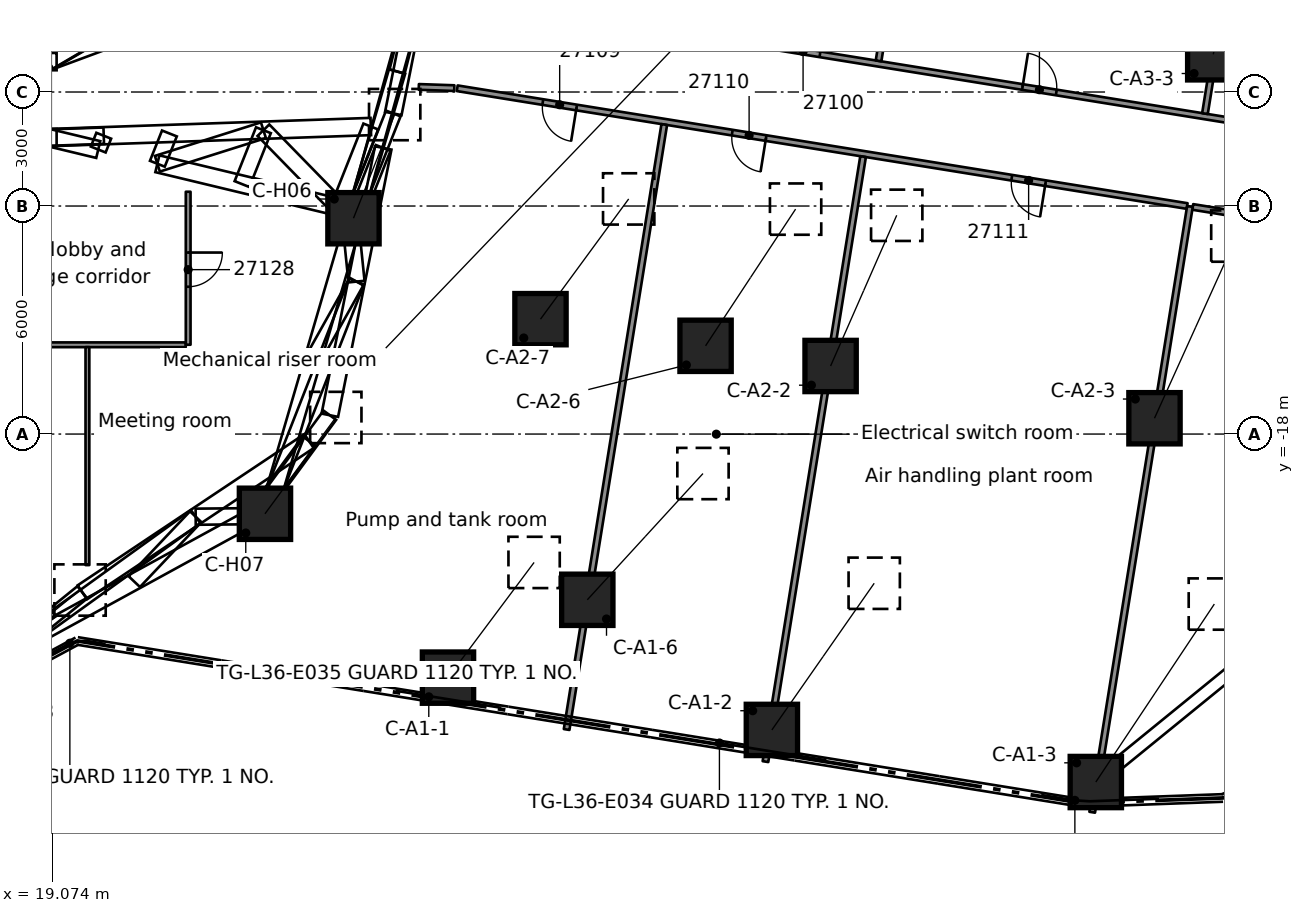
"""IFC4 building model, lengths in metres.
Left out: names, types, materials, properties, quantities, classifications, styles, units other than length and angle.
Written with IfcOpenShell. Run it as: python <this file> out.ifc"""

import sys

from ifc_helpers import new_model, si_unit, direction, frame, frame_2d, origin, origin_2d, place, context, subcontext, project, spatial, rectangle, extrude, element, fill, save


model = new_model("IFC4")
c1 = context("Model", 3, precision=1e-05, world=origin(), true_north=direction((0.0, 1.0)))
c2 = subcontext(c1, "Body", "Model", "MODEL_VIEW")
j1 = project(units=[si_unit("LENGTHUNIT", "METRE"), si_unit("PLANEANGLEUNIT", "RADIAN")], contexts=[c1])
p1 = place(None, origin())
s1 = spatial("IfcSite", under=j1, at=p1, CompositionType="ELEMENT")
p2 = place(p1, origin())
s2 = spatial("IfcBuilding", under=s1, at=p2, CompositionType="ELEMENT")
p3 = place(p2, frame((0.0, 0.0, 141.2)))
s3 = spatial("IfcBuildingStorey", under=s2, at=p3, CompositionType="ELEMENT", Elevation=141.2)
p4 = place(p3, frame((29.488, -24.409, 0.502), z_axis=(0.445669755375, 0.596163130372, 0.667808349101), x_axis=(-0.800935761817, 0.598750286382, 0.0)))
e1 = element("IfcColumn", 1, at=p4, inside=s3, PredefinedType="COLUMN", context=c2, shape_type="SweptSolid", body=[
    extrude(rectangle(XDim=1.35, YDim=1.35, at=origin_2d()), origin(), (0.0, 0.0, 1.0), 5.084),
])
p5 = place(p3, frame((38.011, -25.785, 0.553), z_axis=(0.468842724866, 0.671791143978, 0.573483354783), x_axis=(-0.820040318321, 0.572305754233, 0.0)))
e2 = element("IfcColumn", 2, at=p5, inside=s3, PredefinedType="COLUMN", context=c2, shape_type="SweptSolid", body=[
    extrude(rectangle(XDim=1.35, YDim=1.35, at=origin_2d()), origin(), (0.0, 0.0, 1.0), 5.744),
])
p6 = place(p3, frame((46.535, -27.156, 0.585), z_axis=(0.480787238575, 0.721858234999, 0.497759299047), x_axis=(-0.832290525352, 0.554339680529, 0.0)))
e3 = element("IfcColumn", 3, at=p6, inside=s3, PredefinedType="COLUMN", context=c2, shape_type="SweptSolid", body=[
    extrude(rectangle(XDim=1.35, YDim=1.35, at=origin_2d()), origin(), (0.0, 0.0, 1.0), 6.488),
])
p7 = place(p3, frame((33.154, -22.361, 0.544), z_axis=(0.544321843099, 0.594047747758, 0.592301447331), x_axis=(-0.737291324777, 0.675574942112, 0.0)))
e4 = element("IfcColumn", 4, at=p7, inside=s3, PredefinedType="COLUMN", context=c2, shape_type="SweptSolid", body=[
    extrude(rectangle(XDim=1.35, YDim=1.35, at=origin_2d()), origin(), (0.0, 0.0, 1.0), 5.592),
])
p8 = place(p3, frame((39.556, -16.209, 0.535), z_axis=(0.31854234931, 0.725893965925, 0.609597180054), x_axis=(-0.915710327084, 0.401839018603, 0.0)))
e5 = element("IfcColumn", 5, at=p8, inside=s3, PredefinedType="COLUMN", context=c2, shape_type="SweptSolid", body=[
    extrude(rectangle(XDim=1.35, YDim=1.35, at=origin_2d()), origin(), (0.0, 0.0, 1.0), 5.462),
])
p9 = place(p3, frame((48.079, -17.584, 0.574), z_axis=(0.350418443914, 0.775058009341, 0.52582506247), x_axis=(-0.911197540169, 0.41196971101, 0.0)))
e6 = element("IfcColumn", 6, at=p9, inside=s3, PredefinedType="COLUMN", context=c2, shape_type="SweptSolid", body=[
    extrude(rectangle(XDim=1.35, YDim=1.35, at=origin_2d()), origin(), (0.0, 0.0, 1.0), 6.184),
])
p10 = place(p3, frame((36.266, -15.678, 0.534), z_axis=(0.435018210806, 0.660530073154, 0.61193069765), x_axis=(-0.83515054207, 0.550021428746, 0.0)))
e7 = element("IfcColumn", 7, at=p10, inside=s3, PredefinedType="COLUMN", context=c2, shape_type="SweptSolid", body=[
    extrude(rectangle(XDim=1.35, YDim=1.35, at=origin_2d()), origin(), (0.0, 0.0, 1.0), 5.446),
])
p11 = place(p3, frame((31.922, -14.977, 0.512), z_axis=(0.448305367105, 0.611196881725, 0.65227346228), x_axis=(-0.806345650901, 0.591444580052, 0.0)))
e8 = element("IfcColumn", 8, at=p11, inside=s3, PredefinedType="COLUMN", context=c2, shape_type="SweptSolid", body=[
    extrude(rectangle(XDim=1.35, YDim=1.35, at=origin_2d()), origin(), (0.0, 0.0, 1.0), 5.177),
])
p12 = place(p3, frame((49.625, -8.008, 0.567), z_axis=(0.201746311335, 0.814904031714, 0.543350572798), x_axis=(-0.970694824594, 0.240315537379, 0.0)))
e9 = element("IfcColumn", 9, at=p12, inside=s3, PredefinedType="COLUMN", context=c2, shape_type="SweptSolid", body=[
    extrude(rectangle(XDim=1.35, YDim=1.35, at=origin_2d()), origin(), (0.0, 0.0, 1.0), 6.012),
])
p13 = place(p3, frame((27.001, -12.321, 0.431), z_axis=(0.23580703144, 0.593235257024, 0.769718762762), x_axis=(-0.929277772361, 0.369381674958, 0.0)))
e10 = element("IfcColumn", 10, at=p13, inside=s3, PredefinedType="COLUMN", context=c2, shape_type="SweptSolid", body=[
    extrude(rectangle(XDim=1.35, YDim=1.35, at=origin_2d()), origin(), (0.0, 0.0, 1.0), 4.597),
])
p14 = place(p3, frame((24.672, -20.098, 0.451), z_axis=(0.396226891312, 0.538700406723, 0.743509329059), x_axis=(-0.805562755689, 0.592510461213, 0.0)))
e11 = element("IfcColumn", 11, at=p14, inside=s3, PredefinedType="COLUMN", context=c2, shape_type="SweptSolid", body=[
    extrude(rectangle(XDim=1.35, YDim=1.35, at=origin_2d()), origin(), (0.0, 0.0, 1.0), 4.704),
])
p15 = place(p3, frame((17.526, -23.951, 0.431), z_axis=(0.496016843214, 0.401795419093, 0.769758229864), x_axis=(-0.629442340262, 0.777047193088, 0.0)))
e12 = element("IfcColumn", 12, at=p15, inside=s3, PredefinedType="COLUMN", context=c2, shape_type="SweptSolid", body=[
    extrude(rectangle(XDim=1.35, YDim=1.35, at=origin_2d()), origin(), (0.0, 0.0, 1.0), 4.597),
])
p16 = place(p3, frame((48.938, -12.0, 0.0), z_axis=(0.0, 0.0, 1.0), x_axis=(-0.987231319148, 0.15929319663, 0.0)))
e13 = element("IfcWall", 13, at=p16, inside=s3, PredefinedType="PARTITIONING", context=c2, shape_type="SweptSolid", body=[
    extrude(rectangle(XDim=19.456, YDim=0.15, at=frame_2d((9.728, 0.0))), origin(), (0.0, 0.0, 1.0), 3.98),
])
p17 = place(p16, frame((16.275, 0.0, 0.0)))
e14 = element("IfcOpeningElement", 14, at=p17, cuts=e13, PredefinedType="OPENING", context=c2, shape_type="SweptSolid", body=[
    extrude(rectangle(XDim=0.9, YDim=2.1, at=frame_2d((0.45, 1.05))), frame((0.0, 0.085, 0.0), z_axis=(0.0, -1.0, 0.0), x_axis=(1.0, 0.0, 0.0)), (0.0, 0.0, 1.0), 0.17),
])
p18 = place(p16, frame((11.225, 0.0, 0.0)))
e15 = element("IfcOpeningElement", 15, at=p18, cuts=e13, PredefinedType="OPENING", context=c2, shape_type="SweptSolid", body=[
    extrude(rectangle(XDim=0.9, YDim=2.1, at=frame_2d((0.45, 1.05))), frame((0.0, 0.085, 0.0), z_axis=(0.0, -1.0, 0.0), x_axis=(1.0, 0.0, 0.0)), (0.0, 0.0, 1.0), 0.17),
])
p19 = place(p16, frame((3.775, 0.0, 0.0)))
e16 = element("IfcOpeningElement", 16, at=p19, cuts=e13, PredefinedType="OPENING", context=c2, shape_type="SweptSolid", body=[
    extrude(rectangle(XDim=0.9, YDim=2.1, at=frame_2d((0.45, 1.05))), frame((0.0, 0.085, 0.0), z_axis=(0.0, -1.0, 0.0), x_axis=(1.0, 0.0, 0.0)), (0.0, 0.0, 1.0), 0.17),
])
p20 = place(p3, frame((51.48, -12.41, 0.0), z_axis=(0.0, 0.0, 1.0), x_axis=(-0.987250819117, 0.159172297065, 0.0)))
e17 = element("IfcWall", 17, at=p20, inside=s3, PredefinedType="PARTITIONING", context=c2, shape_type="SweptSolid", body=[
    extrude(rectangle(XDim=2.425, YDim=0.15, at=frame_2d((1.212, 0.0))), origin(), (0.0, 0.0, 1.0), 3.98),
])
p21 = place(p3, frame((30.039, -6.518, 0.0), z_axis=(0.0, 0.0, 1.0), x_axis=(0.987233083285, -0.159282262876, 0.0)))
e18 = element("IfcWall", 18, at=p21, inside=s3, PredefinedType="PARTITIONING", context=c2, shape_type="SweptSolid", body=[
    extrude(rectangle(XDim=22.03, YDim=0.15, at=frame_2d((11.015, 0.0))), origin(), (0.0, 0.0, 1.0), 3.98),
])
p22 = place(p21, frame((8.457, 0.0, 0.0)))
e19 = element("IfcOpeningElement", 19, at=p22, cuts=e18, PredefinedType="OPENING", context=c2, shape_type="SweptSolid", body=[
    extrude(rectangle(XDim=0.9, YDim=2.1, at=frame_2d((0.45, 1.05))), frame((0.0, 0.085, 0.0), z_axis=(0.0, -1.0, 0.0), x_axis=(1.0, 0.0, 0.0)), (0.0, 0.0, 1.0), 0.17),
])
p23 = place(p21, frame((14.756, 0.0, 0.0)))
e20 = element("IfcOpeningElement", 20, at=p23, cuts=e18, PredefinedType="OPENING", context=c2, shape_type="SweptSolid", body=[
    extrude(rectangle(XDim=0.9, YDim=2.1, at=frame_2d((0.45, 1.05))), frame((0.0, 0.085, 0.0), z_axis=(0.0, -1.0, 0.0), x_axis=(1.0, 0.0, 0.0)), (0.0, 0.0, 1.0), 0.17),
])
p24 = place(p3, frame((28.72, -8.866, 0.0), z_axis=(0.0, 0.0, 1.0), x_axis=(0.999414346134, -0.034219362087, 0.0)))
e21 = element("IfcWall", 21, at=p24, inside=s3, PredefinedType="PARTITIONING", context=c2, shape_type="SweptSolid", body=[
    extrude(rectangle(XDim=0.935, YDim=0.15, at=frame_2d((0.467, 0.0))), origin(), (0.0, 0.0, 1.0), 3.98),
])
p25 = place(p3, frame((22.587, -15.651, 0.0), z_axis=(0.0, 0.0, 1.0), x_axis=(-1.0, 0.0, 0.0)))
e22 = element("IfcWall", 22, at=p25, inside=s3, PredefinedType="PARTITIONING", context=c2, shape_type="SweptSolid", body=[
    extrude(rectangle(XDim=10.427, YDim=0.125, at=frame_2d((5.213, 0.0))), origin(), (0.0, 0.0, 1.0), 3.98),
])
p26 = place(p25, frame((5.938, 0.0, 0.0)))
e23 = element("IfcOpeningElement", 23, at=p26, cuts=e22, PredefinedType="OPENING", context=c2, shape_type="SweptSolid", body=[
    extrude(rectangle(XDim=1.1, YDim=2.1, at=frame_2d((0.55, 1.05))), frame((0.0, 0.073, 0.0), z_axis=(0.0, -1.0, 0.0), x_axis=(1.0, 0.0, 0.0)), (0.0, 0.0, 1.0), 0.145),
])
p27 = place(p3, frame((46.44, -27.951, 0.0), z_axis=(0.0, 0.0, 1.0), x_axis=(0.159306129376, 0.987229232318, 0.0)))
e24 = element("IfcWall", 24, at=p27, inside=s3, PredefinedType="PARTITIONING", context=c2, shape_type="SweptSolid", body=[
    extrude(rectangle(XDim=16.145, YDim=0.15, at=frame_2d((8.073, 0.0))), origin(), (0.0, 0.0, 1.0), 3.98),
])
p28 = place(p3, frame((49.407, -9.568, 0.0), z_axis=(0.0, 0.0, 1.0), x_axis=(0.159205981762, 0.987245387617, 0.0)))
e25 = element("IfcWall", 25, at=p28, inside=s3, PredefinedType="PARTITIONING", context=c2, shape_type="SweptSolid", body=[
    extrude(rectangle(XDim=7.543, YDim=0.15, at=frame_2d((3.771, 0.0))), origin(), (0.0, 0.0, 1.0), 3.98),
])
p29 = place(p3, frame((37.842, -26.619, 0.0), z_axis=(0.0, 0.0, 1.0), x_axis=(0.15930955413, 0.98722867967, 0.0)))
e26 = element("IfcWall", 26, at=p29, inside=s3, PredefinedType="PARTITIONING", context=c2, shape_type="SweptSolid", body=[
    extrude(rectangle(XDim=16.125, YDim=0.15, at=frame_2d((8.062, 0.0))), origin(), (0.0, 0.0, 1.0), 3.98),
])
p30 = place(p3, frame((40.818, -8.181, 0.0), z_axis=(0.0, 0.0, 1.0), x_axis=(0.159331101149, 0.987225202376, 0.0)))
e27 = element("IfcWall", 27, at=p30, inside=s3, PredefinedType="PARTITIONING", context=c2, shape_type="SweptSolid", body=[
    extrude(rectangle(XDim=6.846, YDim=0.15, at=frame_2d((3.423, 0.0))), origin(), (0.0, 0.0, 1.0), 3.98),
])
p31 = place(p3, frame((32.61, -25.774, 0.0), z_axis=(0.0, 0.0, 1.0), x_axis=(0.159319079651, 0.987227142485, 0.0)))
e28 = element("IfcWall", 28, at=p31, inside=s3, PredefinedType="PARTITIONING", context=c2, shape_type="SweptSolid", body=[
    extrude(rectangle(XDim=16.124, YDim=0.15, at=frame_2d((8.062, 0.0))), origin(), (0.0, 0.0, 1.0), 3.98),
])
p32 = place(p3, frame((22.651, -11.624, 0.0), z_axis=(0.0, 0.0, 1.0), x_axis=(0.0, -1.0, 0.0)))
e29 = element("IfcWall", 29, at=p32, inside=s3, PredefinedType="PARTITIONING", context=c2, shape_type="SweptSolid", body=[
    extrude(rectangle(XDim=4.026, YDim=0.125, at=frame_2d((2.013, 0.0))), origin(), (0.0, 0.0, 1.0), 3.98),
])
p33 = place(p32, frame((1.6, 0.0, 0.0)))
e30 = element("IfcOpeningElement", 30, at=p33, cuts=e29, PredefinedType="OPENING", context=c2, shape_type="SweptSolid", body=[
    extrude(rectangle(XDim=0.9, YDim=2.1, at=frame_2d((0.45, 1.05))), frame((0.0, 0.073, 0.0), z_axis=(0.0, -1.0, 0.0), x_axis=(1.0, 0.0, 0.0)), (0.0, 0.0, 1.0), 0.145),
])
p34 = place(p3, frame((20.0, -21.448, 0.0), z_axis=(0.0, 0.0, 1.0), x_axis=(0.0, 1.0, 0.0)))
e31 = element("IfcWall", 31, at=p34, inside=s3, PredefinedType="PARTITIONING", context=c2, shape_type="SweptSolid", body=[
    extrude(rectangle(XDim=5.735, YDim=0.1, at=frame_2d((2.868, 0.0))), origin(), (0.0, 0.0, 1.0), 3.98),
])
p35 = place(p22, origin())
e32 = element("IfcDoor", 32, at=p35, inside=s3, OperationType="SINGLE_SWING_LEFT", PredefinedType="DOOR", context=c2, shape_type="SweptSolid", body=[
    extrude(rectangle(XDim=0.9, YDim=2.1, at=frame_2d((0.45, 1.05))), frame((0.0, 0.025, 0.0), z_axis=(0.0, -1.0, 0.0), x_axis=(1.0, 0.0, 0.0)), (0.0, 0.0, 1.0), 0.05),
])
fill(e19, e32)
p36 = place(p23, origin())
e33 = element("IfcDoor", 33, at=p36, inside=s3, OperationType="SINGLE_SWING_RIGHT", PredefinedType="DOOR", context=c2, shape_type="SweptSolid", body=[
    extrude(rectangle(XDim=0.9, YDim=2.1, at=frame_2d((0.45, 1.05))), frame((0.0, 0.025, 0.0), z_axis=(0.0, -1.0, 0.0), x_axis=(1.0, 0.0, 0.0)), (0.0, 0.0, 1.0), 0.05),
])
fill(e20, e33)
p37 = place(p17, origin())
e34 = element("IfcDoor", 34, at=p37, inside=s3, OperationType="SINGLE_SWING_RIGHT", PredefinedType="DOOR", context=c2, shape_type="SweptSolid", body=[
    extrude(rectangle(XDim=0.9, YDim=2.1, at=frame_2d((0.45, 1.05))), frame((0.0, 0.025, 0.0), z_axis=(0.0, -1.0, 0.0), x_axis=(1.0, 0.0, 0.0)), (0.0, 0.0, 1.0), 0.05),
])
fill(e14, e34)
p38 = place(p18, origin())
e35 = element("IfcDoor", 35, at=p38, inside=s3, OperationType="SINGLE_SWING_RIGHT", PredefinedType="DOOR", context=c2, shape_type="SweptSolid", body=[
    extrude(rectangle(XDim=0.9, YDim=2.1, at=frame_2d((0.45, 1.05))), frame((0.0, 0.025, 0.0), z_axis=(0.0, -1.0, 0.0), x_axis=(1.0, 0.0, 0.0)), (0.0, 0.0, 1.0), 0.05),
])
fill(e15, e35)
p39 = place(p19, origin())
e36 = element("IfcDoor", 36, at=p39, inside=s3, OperationType="SINGLE_SWING_LEFT", PredefinedType="DOOR", context=c2, shape_type="SweptSolid", body=[
    extrude(rectangle(XDim=0.9, YDim=2.1, at=frame_2d((0.45, 1.05))), frame((0.0, 0.025, 0.0), z_axis=(0.0, -1.0, 0.0), x_axis=(1.0, 0.0, 0.0)), (0.0, 0.0, 1.0), 0.05),
])
fill(e16, e36)
p40 = place(p33, origin())
e37 = element("IfcDoor", 37, at=p40, inside=s3, OperationType="SINGLE_SWING_RIGHT", PredefinedType="DOOR", context=c2, shape_type="SweptSolid", body=[
    extrude(rectangle(XDim=0.9, YDim=2.1, at=frame_2d((0.45, 1.05))), frame((0.0, 0.025, 0.0), z_axis=(0.0, -1.0, 0.0), x_axis=(1.0, 0.0, 0.0)), (0.0, 0.0, 1.0), 0.05),
])
fill(e30, e37)
save(model, sys.argv[1])
